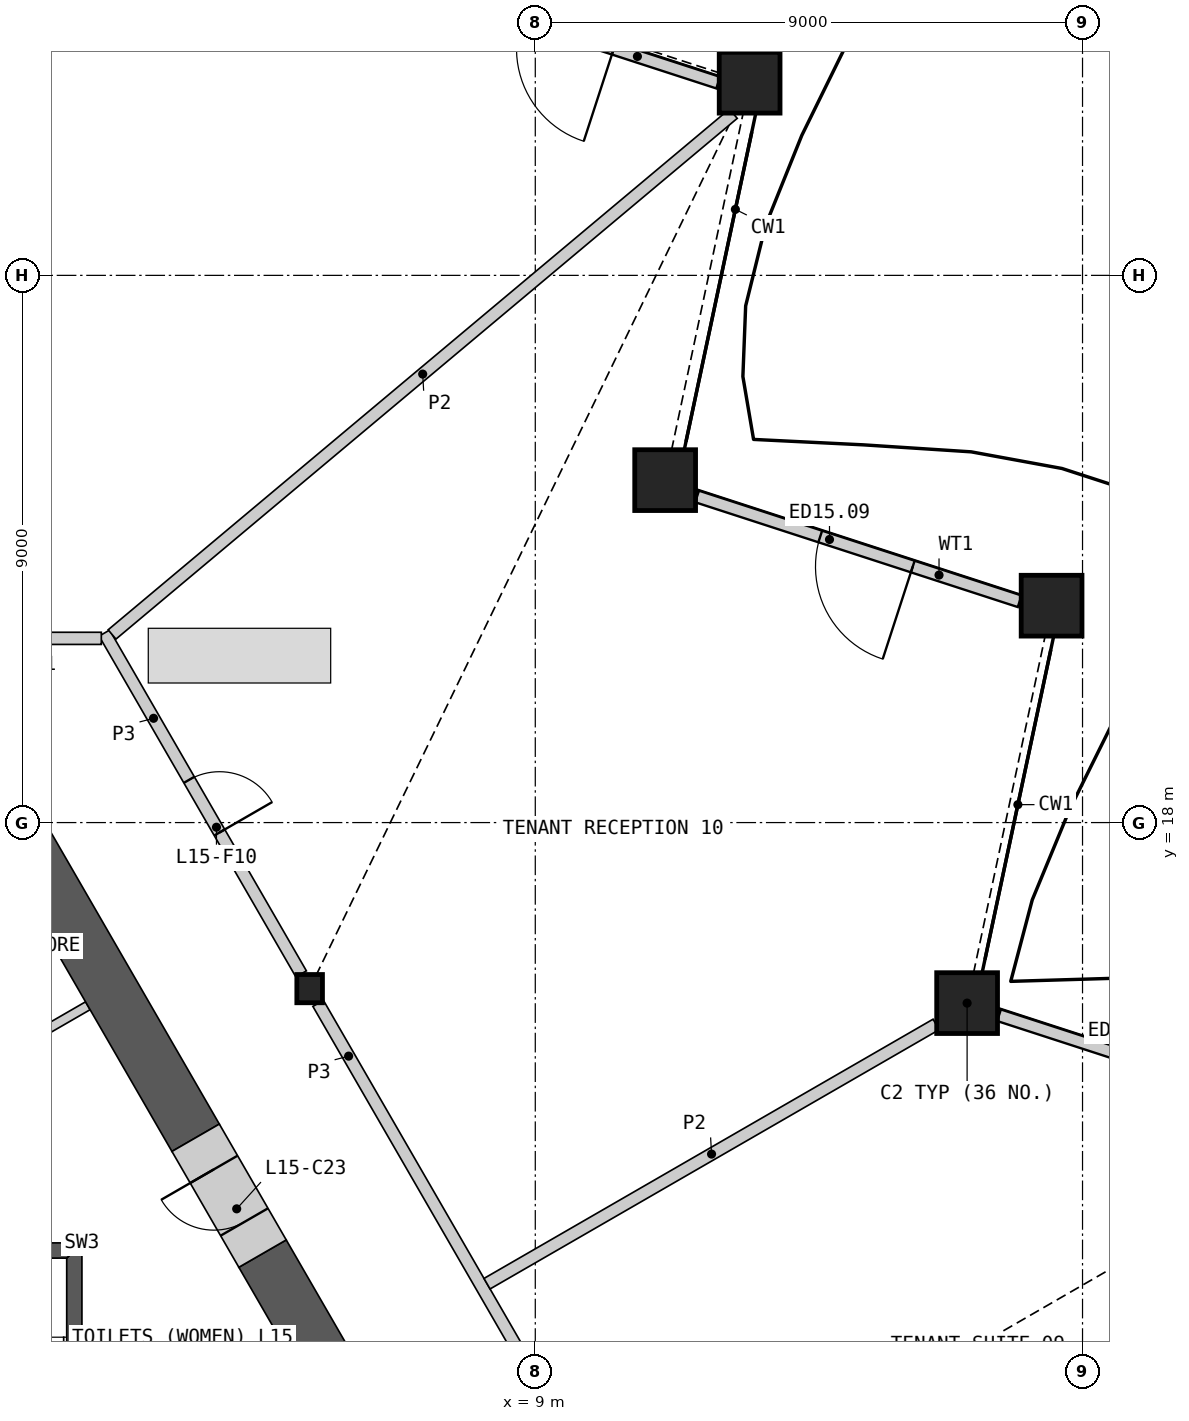
"""IFC4 building model, lengths in metres.
Left out: names, types, materials, properties, quantities, classifications, styles, units other than length and angle.
Written with IfcOpenShell. Run it as: python <this file> out.ifc"""

import sys

from ifc_helpers import new_model, si_unit, direction, frame, frame_2d, origin, origin_2d, place, context, subcontext, project, spatial, polyline, rectangle, hollow_rectangle, i_section, outline, extrude, element, fill, save


model = new_model("IFC4")
c1 = context("Model", 3, precision=1e-05, world=origin(), true_north=direction((0.0, 1.0)))
c2 = subcontext(c1, "Body", "Model", "MODEL_VIEW")
j1 = project(units=[si_unit("LENGTHUNIT", "METRE"), si_unit("PLANEANGLEUNIT", "RADIAN")], contexts=[c1])
p1 = place(None, origin())
s1 = spatial("IfcSite", under=j1, at=p1, CompositionType="ELEMENT")
p2 = place(p1, origin())
s2 = spatial("IfcBuilding", under=s1, at=p2, CompositionType="ELEMENT")
p3 = place(p2, frame((0.0, 0.0, 72.0)))
s3 = spatial("IfcBuildingStorey", under=s2, at=p3, CompositionType="ELEMENT", Elevation=72.0)
for number, where, z_axis, x_axis in (
    (1, (16.102, 15.031, 0.0), (0.0, 0.0, 1.0), (1.0, 0.0, 0.0)),
    (2, (17.491, 21.567, 0.0), (0.0, 0.0, 1.0), (1.0, 0.0, 0.0)),
    (3, (11.136, 23.632, 0.0), (0.0, 0.0, 1.0), (1.0, 0.0, 0.0)),
    (4, (12.525, 30.169, 0.0), (0.0, 0.0, 1.0), (1.0, 0.0, 0.0)),
):
    element("IfcColumn", number, at=place(p3, frame(where, z_axis=z_axis, x_axis=x_axis)), inside=s3, PredefinedType="COLUMN", context=c2, shape_type="SweptSolid", body=[
        extrude(hollow_rectangle(XDim=1.0, YDim=1.0, WallThickness=0.07, at=origin_2d()), origin(), (0.0, 0.0, 1.0), 4.2),
    ])
p4 = place(p3, frame((5.289, 15.269, 0.0), z_axis=(0.0, 0.0, 1.0), x_axis=(1.0, 0.0, 0.0)))
e5 = element("IfcColumn", 5, at=p4, inside=s3, PredefinedType="COLUMN", context=c2, shape_type="SweptSolid", body=[
    extrude(i_section(OverallWidth=0.421, OverallDepth=0.465, WebThickness=0.045, FlangeThickness=0.072, at=origin_2d()), origin(), (0.0, 0.0, 1.0), 4.2),
])
p5 = place(p3, frame((21.933, 13.107, 0.0), z_axis=(0.0, 0.0, 1.0), x_axis=(-0.951066864375, 0.308985144444, 0.0)))
e6 = element("IfcWall", 6, at=p5, inside=s3, PredefinedType="SOLIDWALL", context=c2, shape_type="SweptSolid", body=[
    extrude(rectangle(XDim=5.579, YDim=0.2, at=frame_2d((2.79, 0.0))), origin(), (0.0, 0.0, 1.0), 3.189),
])
p6 = place(p5, frame((1.9, 0.0, 0.0)))
e7 = element("IfcOpeningElement", 7, at=p6, cuts=e6, PredefinedType="OPENING", context=c2, shape_type="SweptSolid", body=[
    extrude(rectangle(XDim=1.6, YDim=2.4, at=frame_2d((0.8, 1.2))), frame((0.0, 0.11, 0.0), z_axis=(0.0, -1.0, 0.0), x_axis=(1.0, 0.0, 0.0)), (0.0, 0.0, 1.0), 0.22),
])
p7 = place(p3, frame((16.967, 21.64, 0.0), z_axis=(0.0, 0.0, 1.0), x_axis=(-0.951054004345, 0.309024725255, 0.0)))
e8 = element("IfcWall", 8, at=p7, inside=s3, PredefinedType="SOLIDWALL", context=c2, shape_type="SweptSolid", body=[
    extrude(rectangle(XDim=5.579, YDim=0.2, at=frame_2d((2.79, 0.0))), origin(), (0.0, 0.0, 1.0), 3.189),
])
p8 = place(p7, frame((1.849, 0.0, 0.0)))
e9 = element("IfcOpeningElement", 9, at=p8, cuts=e8, PredefinedType="OPENING", context=c2, shape_type="SweptSolid", body=[
    extrude(rectangle(XDim=1.6, YDim=2.4, at=frame_2d((0.8, 1.2))), frame((0.0, 0.11, 0.0), z_axis=(0.0, -1.0, 0.0), x_axis=(1.0, 0.0, 0.0)), (0.0, 0.0, 1.0), 0.22),
])
p9 = place(p3, frame((12.008, 30.17, 0.0), z_axis=(0.0, 0.0, 1.0), x_axis=(-0.951054939127, 0.309021848358, 0.0)))
e10 = element("IfcWall", 10, at=p9, inside=s3, PredefinedType="SOLIDWALL", context=c2, shape_type="SweptSolid", body=[
    extrude(rectangle(XDim=5.587, YDim=0.2, at=frame_2d((2.793, 0.0))), origin(), (0.0, 0.0, 1.0), 3.189),
])
p10 = place(p9, frame((1.805, 0.0, 0.0)))
e11 = element("IfcOpeningElement", 11, at=p10, cuts=e10, PredefinedType="OPENING", context=c2, shape_type="SweptSolid", body=[
    extrude(rectangle(XDim=1.6, YDim=2.4, at=frame_2d((0.8, 1.2))), frame((0.0, 0.11, 0.0), z_axis=(0.0, -1.0, 0.0), x_axis=(1.0, 0.0, 0.0)), (0.0, 0.0, 1.0), 0.22),
])
p11 = place(p3, origin())
e12 = element("IfcWall", 12, at=p11, inside=s3, PredefinedType="SHEAR", context=c2, shape_type="SweptSolid", body=[
    extrude(outline(polyline([(1.544, 5.237), (1.544, 11.087), (1.294, 10.837), (1.294, 5.237), (1.544, 5.237)])), origin(), (0.0, 0.0, 1.0), 3.8),
])
p12 = place(p3, origin())
e13 = element("IfcWall", 13, at=p12, inside=s3, PredefinedType="SHEAR", context=c2, shape_type="SweptSolid", body=[
    extrude(outline(polyline([(1.544, 11.087), (-1.544, 11.087), (-1.294, 10.837), (1.294, 10.837), (1.544, 11.087)])), origin(), (0.0, 0.0, 1.0), 3.8),
])
p13 = place(p3, frame((1.641, 14.987, 0.0), z_axis=(0.0, 0.0, 1.0), x_axis=(-0.86602253128, -0.50000497529, 0.0)))
e14 = element("IfcWall", 14, at=p13, inside=s3, PredefinedType="PARTITIONING", context=c2, shape_type="SweptSolid", body=[
    extrude(rectangle(XDim=5.685, YDim=0.15, at=frame_2d((2.843, 0.0))), origin(), (0.0, 0.0, 1.0), 3.8),
])
p14 = place(p3, frame((7.807, 5.208, 0.0), z_axis=(0.0, 0.0, 1.0), x_axis=(-0.499986664161, 0.866033103098, 0.0)))
e15 = element("IfcWall", 15, at=p14, inside=s3, PredefinedType="SHEAR", context=c2, shape_type="SweptSolid", body=[
    extrude(rectangle(XDim=6.586, YDim=0.9, at=frame_2d((3.293, 0.0))), origin(), (0.0, 0.0, 1.0), 3.8),
])
p15 = place(p3, frame((3.414, 12.816, 0.0), z_axis=(0.0, 0.0, 1.0), x_axis=(-0.500006596359, 0.866021595341, 0.0)))
e16 = element("IfcWall", 16, at=p15, inside=s3, PredefinedType="SHEAR", context=c2, shape_type="SweptSolid", body=[
    extrude(rectangle(XDim=6.049, YDim=0.9, at=frame_2d((3.025, 0.0))), origin(), (0.0, 0.0, 1.0), 3.8),
])
p16 = place(p3, frame((4.514, 10.911, 0.0), z_axis=(0.0, 0.0, 1.0), x_axis=(-0.50002983664, 0.866008176907, 0.0)))
e17 = element("IfcWall", 17, at=p16, inside=s3, PredefinedType="SHEAR", context=c2, shape_type="SweptSolid", body=[
    extrude(rectangle(XDim=2.2, YDim=0.9, at=frame_2d((1.1, 0.0))), origin(), (0.0, 0.0, 1.0), 3.8),
])
p17 = place(p16, frame((0.6, 0.0, 0.0)))
e18 = element("IfcOpeningElement", 18, at=p17, cuts=e17, PredefinedType="OPENING", context=c2, shape_type="SweptSolid", body=[
    extrude(rectangle(XDim=1.0, YDim=2.1, at=frame_2d((0.5, 1.05))), frame((0.0, 0.46, 0.0), z_axis=(0.0, -1.0, 0.0), x_axis=(1.0, 0.0, 0.0)), (0.0, 0.0, 1.0), 0.92),
])
p18 = place(p3, frame((5.429, 15.026, 0.0), z_axis=(0.0, 0.0, 1.0), x_axis=(0.50001002959, -0.86601961312, 0.0)))
e19 = element("IfcWall", 19, at=p18, inside=s3, PredefinedType="PARTITIONING", context=c2, shape_type="SweptSolid", body=[
    extrude(rectangle(XDim=10.019, YDim=0.2, at=frame_2d((5.009, 0.0))), origin(), (0.0, 0.0, 1.0), 3.8),
])
p19 = place(p18, frame((7.165, 0.0, 0.0)))
e20 = element("IfcOpeningElement", 20, at=p19, cuts=e19, PredefinedType="OPENING", context=c2, shape_type="SweptSolid", body=[
    extrude(rectangle(XDim=1.0, YDim=2.1, at=frame_2d((0.5, 1.05))), frame((0.0, 0.11, 0.0), z_axis=(0.0, -1.0, 0.0), x_axis=(1.0, 0.0, 0.0)), (0.0, 0.0, 1.0), 0.22),
])
p20 = place(p3, frame((1.913, 21.116, 0.0), z_axis=(0.0, 0.0, 1.0), x_axis=(0.500001069878, -0.866024786089, 0.0)))
e21 = element("IfcWall", 21, at=p20, inside=s3, PredefinedType="PARTITIONING", context=c2, shape_type="SweptSolid", body=[
    extrude(rectangle(XDim=6.473, YDim=0.2, at=frame_2d((3.236, 0.0))), origin(), (0.0, 0.0, 1.0), 3.8),
])
p21 = place(p20, frame((2.787, 0.0, 0.0)))
e22 = element("IfcOpeningElement", 22, at=p21, cuts=e21, PredefinedType="OPENING", context=c2, shape_type="SweptSolid", body=[
    extrude(rectangle(XDim=1.0, YDim=2.1, at=frame_2d((0.5, 1.05))), frame((0.0, 0.11, 0.0), z_axis=(0.0, -1.0, 0.0), x_axis=(1.0, 0.0, 0.0)), (0.0, 0.0, 1.0), 0.22),
])
p22 = place(p3, frame((-1.863, 21.03, 0.0), z_axis=(0.0, 0.0, 1.0), x_axis=(1.0, 0.0, 0.0)))
e23 = element("IfcWall", 23, at=p22, inside=s3, PredefinedType="PARTITIONING", context=c2, shape_type="SweptSolid", body=[
    extrude(rectangle(XDim=3.726, YDim=0.2, at=frame_2d((1.863, 0.0))), origin(), (0.0, 0.0, 1.0), 3.8),
])
p23 = place(p22, frame((0.963, 0.0, 0.0)))
e24 = element("IfcOpeningElement", 24, at=p23, cuts=e23, PredefinedType="OPENING", context=c2, shape_type="SweptSolid", body=[
    extrude(rectangle(XDim=1.8, YDim=2.1, at=frame_2d((0.9, 1.05))), frame((0.0, 0.11, 0.0), z_axis=(0.0, -1.0, 0.0), x_axis=(1.0, 0.0, 0.0)), (0.0, 0.0, 1.0), 0.22),
])
p24 = place(p3, frame((2.04, 21.094, 0.0), z_axis=(0.0, 0.0, 1.0), x_axis=(0.766370381447, 0.642398971388, 0.0)))
e25 = element("IfcWall", 25, at=p24, inside=s3, PredefinedType="PARTITIONING", context=c2, shape_type="SweptSolid", body=[
    extrude(rectangle(XDim=13.332, YDim=0.2, at=frame_2d((6.666, 0.0))), origin(), (0.0, 0.0, 1.0), 2.885),
])
p25 = place(p3, frame((8.207, 10.416, 0.0), z_axis=(0.0, 0.0, 1.0), x_axis=(0.866023490266, 0.500003314297, 0.0)))
e26 = element("IfcWall", 26, at=p25, inside=s3, PredefinedType="PARTITIONING", context=c2, shape_type="SweptSolid", body=[
    extrude(rectangle(XDim=8.528, YDim=0.2, at=frame_2d((4.264, 0.0))), origin(), (0.0, 0.0, 1.0), 2.885),
])
p26 = place(p8, origin())
e27 = element("IfcDoor", 27, at=p26, inside=s3, OperationType="DOUBLE_DOOR_SINGLE_SWING", PredefinedType="DOOR", context=c2, shape_type="SweptSolid", body=[
    extrude(rectangle(XDim=1.6, YDim=2.4, at=frame_2d((0.8, 1.2))), frame((0.0, 0.025, 0.0), z_axis=(0.0, -1.0, 0.0), x_axis=(1.0, 0.0, 0.0)), (0.0, 0.0, 1.0), 0.05),
])
fill(e9, e27)
p27 = place(p17, origin())
e28 = element("IfcDoor", 28, at=p27, inside=s3, OperationType="SINGLE_SWING_RIGHT", PredefinedType="DOOR", context=c2, shape_type="SweptSolid", body=[
    extrude(rectangle(XDim=1.0, YDim=2.1, at=frame_2d((0.5, 1.05))), frame((0.0, 0.205, 0.0), z_axis=(0.0, -1.0, 0.0), x_axis=(1.0, 0.0, 0.0)), (0.0, 0.0, 1.0), 0.05),
])
fill(e18, e28)
p28 = place(p21, origin())
e29 = element("IfcDoor", 29, at=p28, inside=s3, OperationType="SINGLE_SWING_RIGHT", PredefinedType="DOOR", context=c2, shape_type="SweptSolid", body=[
    extrude(rectangle(XDim=1.0, YDim=2.1, at=frame_2d((0.5, 1.05))), frame((0.0, 0.025, 0.0), z_axis=(0.0, -1.0, 0.0), x_axis=(1.0, 0.0, 0.0)), (0.0, 0.0, 1.0), 0.05),
])
fill(e22, e29)
save(model, sys.argv[1])
